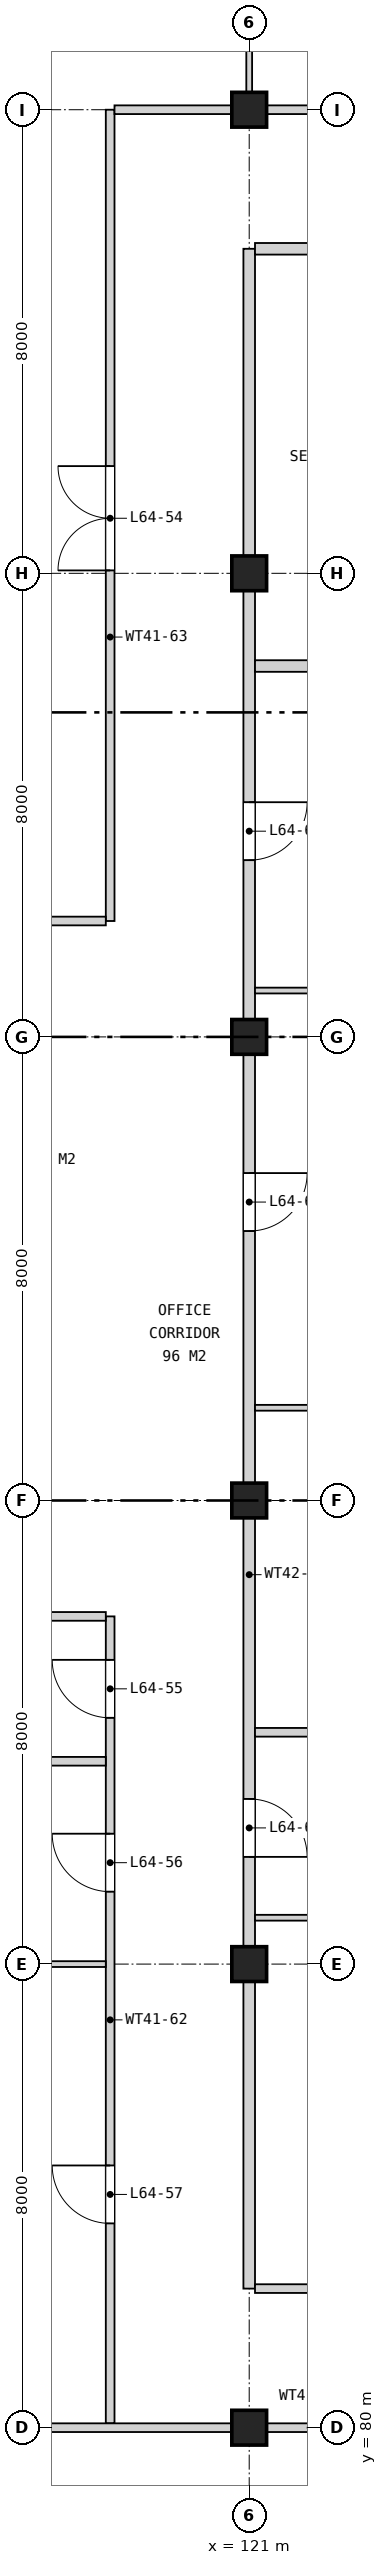
"""IFC4 building model, lengths in metres.
Left out: names, types, materials, properties, quantities, classifications, styles, units other than length and angle.
Written with IfcOpenShell. Run it as: python <this file> out.ifc"""

import sys

from ifc_helpers import new_model, si_unit, direction, frame, frame_2d, origin, origin_2d, place, context, subcontext, project, spatial, rectangle, extrude, element, fill, save


model = new_model("IFC4")
c1 = context("Model", 3, precision=1e-05, world=origin(), true_north=direction((0.0, 1.0)))
c2 = subcontext(c1, "Body", "Model", "MODEL_VIEW")
j1 = project(units=[si_unit("LENGTHUNIT", "METRE"), si_unit("PLANEANGLEUNIT", "RADIAN")], contexts=[c1])
p1 = place(None, origin())
s1 = spatial("IfcSite", under=j1, at=p1, CompositionType="ELEMENT")
p2 = place(p1, origin())
s2 = spatial("IfcBuilding", under=s1, at=p2, CompositionType="ELEMENT")
p3 = place(p2, frame((0.0, 0.0, 295.5)))
s3 = spatial("IfcBuildingStorey", under=s2, at=p3, CompositionType="ELEMENT", Elevation=295.5)
for number, where, z_axis, x_axis in (
    (1, (121.0, 80.0, 0.0), (0.0, 0.0, 1.0), (1.0, 0.0, 0.0)),
    (2, (121.0, 88.0, 0.0), (0.0, 0.0, 1.0), (1.0, 0.0, 0.0)),
    (3, (121.0, 96.0, 0.0), (0.0, 0.0, 1.0), (1.0, 0.0, 0.0)),
    (4, (121.0, 104.0, 0.0), (0.0, 0.0, 1.0), (1.0, 0.0, 0.0)),
    (5, (121.0, 112.0, 0.0), (0.0, 0.0, 1.0), (1.0, 0.0, 0.0)),
    (6, (121.0, 120.0, 0.0), (0.0, 0.0, 1.0), (1.0, 0.0, 0.0)),
):
    element("IfcColumn", number, at=place(p3, frame(where, z_axis=z_axis, x_axis=x_axis)), inside=s3, PredefinedType="COLUMN", context=c2, shape_type="SweptSolid", body=[
        extrude(rectangle(XDim=0.6, YDim=0.6, at=origin_2d()), origin(), (0.0, 0.0, 1.0), 4.2),
    ])
p4 = place(p3, frame((118.6, 80.075, 0.0), z_axis=(0.0, 0.0, 1.0), x_axis=(0.0, 1.0, 0.0)))
e7 = element("IfcWall", 7, at=p4, inside=s3, PredefinedType="PARTITIONING", context=c2, shape_type="SweptSolid", body=[
    extrude(rectangle(XDim=13.925, YDim=0.15, at=frame_2d((6.962, 0.0))), origin(), (0.0, 0.0, 1.0), 3.443),
])
p5 = place(p4, frame((12.175, 0.0, 0.0)))
e8 = element("IfcOpeningElement", 8, at=p5, cuts=e7, PredefinedType="OPENING", context=c2, shape_type="SweptSolid", body=[
    extrude(rectangle(XDim=1.0, YDim=2.1, at=frame_2d((0.5, 1.05))), frame((0.0, 0.085, 0.0), z_axis=(0.0, -1.0, 0.0), x_axis=(1.0, 0.0, 0.0)), (0.0, 0.0, 1.0), 0.17),
])
p6 = place(p4, frame((9.175, 0.0, 0.0)))
e9 = element("IfcOpeningElement", 9, at=p6, cuts=e7, PredefinedType="OPENING", context=c2, shape_type="SweptSolid", body=[
    extrude(rectangle(XDim=1.0, YDim=2.1, at=frame_2d((0.5, 1.05))), frame((0.0, 0.085, 0.0), z_axis=(0.0, -1.0, 0.0), x_axis=(1.0, 0.0, 0.0)), (0.0, 0.0, 1.0), 0.17),
])
p7 = place(p4, frame((3.45, 0.0, 0.0)))
e10 = element("IfcOpeningElement", 10, at=p7, cuts=e7, PredefinedType="OPENING", context=c2, shape_type="SweptSolid", body=[
    extrude(rectangle(XDim=1.0, YDim=2.1, at=frame_2d((0.5, 1.05))), frame((0.0, 0.085, 0.0), z_axis=(0.0, -1.0, 0.0), x_axis=(1.0, 0.0, 0.0)), (0.0, 0.0, 1.0), 0.17),
])
p8 = place(p3, frame((118.6, 106.0, 0.0), z_axis=(0.0, 0.0, 1.0), x_axis=(0.0, 1.0, 0.0)))
e11 = element("IfcWall", 11, at=p8, inside=s3, PredefinedType="PARTITIONING", context=c2, shape_type="SweptSolid", body=[
    extrude(rectangle(XDim=14.0, YDim=0.15, at=frame_2d((7.0, 0.0))), origin(), (0.0, 0.0, 1.0), 3.443),
])
p9 = place(p8, frame((6.05, 0.0, 0.0)))
e12 = element("IfcOpeningElement", 12, at=p9, cuts=e11, PredefinedType="OPENING", context=c2, shape_type="SweptSolid", body=[
    extrude(rectangle(XDim=1.8, YDim=2.1, at=frame_2d((0.9, 1.05))), frame((0.0, 0.085, 0.0), z_axis=(0.0, -1.0, 0.0), x_axis=(1.0, 0.0, 0.0)), (0.0, 0.0, 1.0), 0.17),
])
p10 = place(p3, frame((121.0, 82.4, 0.0), z_axis=(0.0, 0.0, 1.0), x_axis=(0.0, 1.0, 0.0)))
e13 = element("IfcWall", 13, at=p10, inside=s3, PredefinedType="SOLIDWALL", context=c2, shape_type="SweptSolid", body=[
    extrude(rectangle(XDim=35.2, YDim=0.2, at=frame_2d((17.6, 0.0))), origin(), (0.0, 0.0, 1.0), 3.443),
])
p11 = place(p10, frame((7.45, 0.0, 0.0)))
e14 = element("IfcOpeningElement", 14, at=p11, cuts=e13, PredefinedType="OPENING", context=c2, shape_type="SweptSolid", body=[
    extrude(rectangle(XDim=1.0, YDim=2.1, at=frame_2d((0.5, 1.05))), frame((0.0, 0.11, 0.0), z_axis=(0.0, -1.0, 0.0), x_axis=(1.0, 0.0, 0.0)), (0.0, 0.0, 1.0), 0.22),
])
p12 = place(p10, frame((18.25, 0.0, 0.0)))
e15 = element("IfcOpeningElement", 15, at=p12, cuts=e13, PredefinedType="OPENING", context=c2, shape_type="SweptSolid", body=[
    extrude(rectangle(XDim=1.0, YDim=2.1, at=frame_2d((0.5, 1.05))), frame((0.0, 0.11, 0.0), z_axis=(0.0, -1.0, 0.0), x_axis=(1.0, 0.0, 0.0)), (0.0, 0.0, 1.0), 0.22),
])
p13 = place(p10, frame((24.65, 0.0, 0.0)))
e16 = element("IfcOpeningElement", 16, at=p13, cuts=e13, PredefinedType="OPENING", context=c2, shape_type="SweptSolid", body=[
    extrude(rectangle(XDim=1.0, YDim=2.1, at=frame_2d((0.5, 1.05))), frame((0.0, 0.11, 0.0), z_axis=(0.0, -1.0, 0.0), x_axis=(1.0, 0.0, 0.0)), (0.0, 0.0, 1.0), 0.22),
])
p14 = place(p3, frame((121.0, 120.075, 0.0), z_axis=(0.0, 0.0, 1.0), x_axis=(0.0, 1.0, 0.0)))
e17 = element("IfcWall", 17, at=p14, inside=s3, PredefinedType="PARTITIONING", context=c2, shape_type="SweptSolid", body=[
    extrude(rectangle(XDim=8.145, YDim=0.1, at=frame_2d((4.073, 0.0))), origin(), (0.0, 0.0, 1.0), 3.443),
])
p15 = place(p3, frame((112.78, 80.0, 0.0), z_axis=(0.0, 0.0, 1.0), x_axis=(1.0, 0.0, 0.0)))
e18 = element("IfcWall", 18, at=p15, inside=s3, PredefinedType="PARTITIONING", context=c2, shape_type="SweptSolid", body=[
    extrude(rectangle(XDim=18.545, YDim=0.15, at=frame_2d((9.272, 0.0))), origin(), (0.0, 0.0, 1.0), 3.443),
])
p16 = place(p15, frame((11.27, 0.0, 0.0)))
e19 = element("IfcOpeningElement", 19, at=p16, cuts=e18, PredefinedType="OPENING", context=c2, shape_type="SweptSolid", body=[
    extrude(rectangle(XDim=1.8, YDim=2.1, at=frame_2d((0.9, 1.05))), frame((0.0, 0.085, 0.0), z_axis=(0.0, -1.0, 0.0), x_axis=(1.0, 0.0, 0.0)), (0.0, 0.0, 1.0), 0.17),
])
p17 = place(p3, frame((121.1, 82.4, 0.0), z_axis=(0.0, 0.0, 1.0), x_axis=(1.0, 0.0, 0.0)))
e20 = element("IfcWall", 20, at=p17, inside=s3, PredefinedType="PARTITIONING", context=c2, shape_type="SweptSolid", body=[
    extrude(rectangle(XDim=7.825, YDim=0.15, at=frame_2d((3.913, 0.0))), origin(), (0.0, 0.0, 1.0), 3.443),
])
p18 = place(p17, frame((3.45, 0.0, 0.0)))
e21 = element("IfcOpeningElement", 21, at=p18, cuts=e20, PredefinedType="OPENING", context=c2, shape_type="SweptSolid", body=[
    extrude(rectangle(XDim=1.0, YDim=2.1, at=frame_2d((0.5, 1.05))), frame((0.0, 0.085, 0.0), z_axis=(0.0, -1.0, 0.0), x_axis=(1.0, 0.0, 0.0)), (0.0, 0.0, 1.0), 0.17),
])
p19 = place(p3, frame((113.0, 88.0, 0.0), z_axis=(0.0, 0.0, 1.0), x_axis=(1.0, 0.0, 0.0)))
e22 = element("IfcWall", 22, at=p19, inside=s3, PredefinedType="PARTITIONING", context=c2, shape_type="SweptSolid", body=[
    extrude(rectangle(XDim=5.525, YDim=0.1, at=frame_2d((2.762, 0.0))), origin(), (0.0, 0.0, 1.0), 3.443),
])
p20 = place(p3, frame((121.1, 88.8, 0.0), z_axis=(0.0, 0.0, 1.0), x_axis=(1.0, 0.0, 0.0)))
e23 = element("IfcWall", 23, at=p20, inside=s3, PredefinedType="PARTITIONING", context=c2, shape_type="SweptSolid", body=[
    extrude(rectangle(XDim=7.825, YDim=0.1, at=frame_2d((3.913, 0.0))), origin(), (0.0, 0.0, 1.0), 3.443),
])
p21 = place(p3, frame((113.0, 91.5, 0.0), z_axis=(0.0, 0.0, 1.0), x_axis=(1.0, 0.0, 0.0)))
e24 = element("IfcWall", 24, at=p21, inside=s3, PredefinedType="PARTITIONING", context=c2, shape_type="SweptSolid", body=[
    extrude(rectangle(XDim=5.525, YDim=0.15, at=frame_2d((2.762, 0.0))), origin(), (0.0, 0.0, 1.0), 3.443),
])
p22 = place(p3, frame((121.1, 92.0, 0.0), z_axis=(0.0, 0.0, 1.0), x_axis=(1.0, 0.0, 0.0)))
e25 = element("IfcWall", 25, at=p22, inside=s3, PredefinedType="PARTITIONING", context=c2, shape_type="SweptSolid", body=[
    extrude(rectangle(XDim=7.825, YDim=0.15, at=frame_2d((3.913, 0.0))), origin(), (0.0, 0.0, 1.0), 3.443),
])
p23 = place(p3, frame((113.0, 94.0, 0.0), z_axis=(0.0, 0.0, 1.0), x_axis=(1.0, 0.0, 0.0)))
e26 = element("IfcWall", 26, at=p23, inside=s3, PredefinedType="PARTITIONING", context=c2, shape_type="SweptSolid", body=[
    extrude(rectangle(XDim=5.525, YDim=0.15, at=frame_2d((2.762, 0.0))), origin(), (0.0, 0.0, 1.0), 3.443),
])
for number, where, z_axis, x_axis in (
    (27, (121.1, 97.6, 0.0), (0.0, 0.0, 1.0), (1.0, 0.0, 0.0)),
    (28, (121.1, 104.8, 0.0), (0.0, 0.0, 1.0), (1.0, 0.0, 0.0)),
):
    element("IfcWall", number, at=place(p3, frame(where, z_axis=z_axis, x_axis=x_axis)), inside=s3, PredefinedType="PARTITIONING", context=c2, shape_type="SweptSolid", body=[
        extrude(rectangle(XDim=7.825, YDim=0.1, at=frame_2d((3.913, 0.0))), origin(), (0.0, 0.0, 1.0), 3.443),
    ])
p24 = place(p3, frame((113.0, 106.0, 0.0), z_axis=(0.0, 0.0, 1.0), x_axis=(1.0, 0.0, 0.0)))
e29 = element("IfcWall", 29, at=p24, inside=s3, PredefinedType="PARTITIONING", context=c2, shape_type="SweptSolid", body=[
    extrude(rectangle(XDim=5.525, YDim=0.15, at=frame_2d((2.762, 0.0))), origin(), (0.0, 0.0, 1.0), 3.443),
])
p25 = place(p3, frame((121.1, 117.6, 0.0), z_axis=(0.0, 0.0, 1.0), x_axis=(1.0, 0.0, 0.0)))
e30 = element("IfcWall", 30, at=p25, inside=s3, PredefinedType="SOLIDWALL", context=c2, shape_type="SweptSolid", body=[
    extrude(rectangle(XDim=7.9, YDim=0.2, at=frame_2d((3.95, 0.0))), origin(), (0.0, 0.0, 1.0), 3.443),
])
p26 = place(p25, frame((1.45, 0.0, 0.0)))
e31 = element("IfcOpeningElement", 31, at=p26, cuts=e30, PredefinedType="OPENING", context=c2, shape_type="SweptSolid", body=[
    extrude(rectangle(XDim=1.0, YDim=2.1, at=frame_2d((0.5, 1.05))), frame((0.0, 0.11, 0.0), z_axis=(0.0, -1.0, 0.0), x_axis=(1.0, 0.0, 0.0)), (0.0, 0.0, 1.0), 0.22),
])
p27 = place(p25, frame((5.35, 0.0, 0.0)))
e32 = element("IfcOpeningElement", 32, at=p27, cuts=e30, PredefinedType="OPENING", context=c2, shape_type="SweptSolid", body=[
    extrude(rectangle(XDim=1.0, YDim=2.1, at=frame_2d((0.5, 1.05))), frame((0.0, 0.11, 0.0), z_axis=(0.0, -1.0, 0.0), x_axis=(1.0, 0.0, 0.0)), (0.0, 0.0, 1.0), 0.22),
])
p28 = place(p3, frame((118.675, 120.0, 0.0), z_axis=(0.0, 0.0, 1.0), x_axis=(1.0, 0.0, 0.0)))
e33 = element("IfcWall", 33, at=p28, inside=s3, PredefinedType="PARTITIONING", context=c2, shape_type="SweptSolid", body=[
    extrude(rectangle(XDim=18.545, YDim=0.15, at=frame_2d((9.272, 0.0))), origin(), (0.0, 0.0, 1.0), 3.443),
])
p29 = place(p28, frame((5.375, 0.0, 0.0)))
e34 = element("IfcOpeningElement", 34, at=p29, cuts=e33, PredefinedType="OPENING", context=c2, shape_type="SweptSolid", body=[
    extrude(rectangle(XDim=1.8, YDim=2.1, at=frame_2d((0.9, 1.05))), frame((0.0, 0.085, 0.0), z_axis=(0.0, -1.0, 0.0), x_axis=(1.0, 0.0, 0.0)), (0.0, 0.0, 1.0), 0.17),
])
p30 = place(p3, frame((121.1, 110.4, 0.0), z_axis=(0.0, 0.0, 1.0), x_axis=(1.0, 0.0, 0.0)))
e35 = element("IfcWall", 35, at=p30, inside=s3, PredefinedType="SOLIDWALL", context=c2, shape_type="SweptSolid", body=[
    extrude(rectangle(XDim=3.8, YDim=0.2, at=frame_2d((1.9, 0.0))), origin(), (0.0, 0.0, 1.0), 3.443),
])
p31 = place(p9, origin())
e36 = element("IfcDoor", 36, at=p31, inside=s3, OperationType="DOUBLE_DOOR_SINGLE_SWING", PredefinedType="DOOR", context=c2, shape_type="SweptSolid", body=[
    extrude(rectangle(XDim=1.8, YDim=2.1, at=frame_2d((0.9, 1.05))), frame((0.0, 0.025, 0.0), z_axis=(0.0, -1.0, 0.0), x_axis=(1.0, 0.0, 0.0)), (0.0, 0.0, 1.0), 0.05),
])
fill(e12, e36)
p32 = place(p5, origin())
e37 = element("IfcDoor", 37, at=p32, inside=s3, OperationType="SINGLE_SWING_RIGHT", PredefinedType="DOOR", context=c2, shape_type="SweptSolid", body=[
    extrude(rectangle(XDim=1.0, YDim=2.1, at=frame_2d((0.5, 1.05))), frame((0.0, 0.025, 0.0), z_axis=(0.0, -1.0, 0.0), x_axis=(1.0, 0.0, 0.0)), (0.0, 0.0, 1.0), 0.05),
])
fill(e8, e37)
p33 = place(p6, origin())
e38 = element("IfcDoor", 38, at=p33, inside=s3, OperationType="SINGLE_SWING_RIGHT", PredefinedType="DOOR", context=c2, shape_type="SweptSolid", body=[
    extrude(rectangle(XDim=1.0, YDim=2.1, at=frame_2d((0.5, 1.05))), frame((0.0, 0.025, 0.0), z_axis=(0.0, -1.0, 0.0), x_axis=(1.0, 0.0, 0.0)), (0.0, 0.0, 1.0), 0.05),
])
fill(e9, e38)
p34 = place(p7, origin())
e39 = element("IfcDoor", 39, at=p34, inside=s3, OperationType="SINGLE_SWING_RIGHT", PredefinedType="DOOR", context=c2, shape_type="SweptSolid", body=[
    extrude(rectangle(XDim=1.0, YDim=2.1, at=frame_2d((0.5, 1.05))), frame((0.0, 0.025, 0.0), z_axis=(0.0, -1.0, 0.0), x_axis=(1.0, 0.0, 0.0)), (0.0, 0.0, 1.0), 0.05),
])
fill(e10, e39)
p35 = place(p11, frame((1.0, 0.0, 0.0), z_axis=(0.0, 0.0, 1.0), x_axis=(-1.0, 0.0, 0.0)))
e40 = element("IfcDoor", 40, at=p35, inside=s3, OperationType="SINGLE_SWING_RIGHT", PredefinedType="DOOR", context=c2, shape_type="SweptSolid", body=[
    extrude(rectangle(XDim=1.0, YDim=2.1, at=frame_2d((0.5, 1.05))), frame((0.0, 0.025, 0.0), z_axis=(0.0, -1.0, 0.0), x_axis=(1.0, 0.0, 0.0)), (0.0, 0.0, 1.0), 0.05),
])
fill(e14, e40)
p36 = place(p12, frame((1.0, 0.0, 0.0), z_axis=(0.0, 0.0, 1.0), x_axis=(-1.0, 0.0, 0.0)))
e41 = element("IfcDoor", 41, at=p36, inside=s3, OperationType="SINGLE_SWING_LEFT", PredefinedType="DOOR", context=c2, shape_type="SweptSolid", body=[
    extrude(rectangle(XDim=1.0, YDim=2.1, at=frame_2d((0.5, 1.05))), frame((0.0, 0.025, 0.0), z_axis=(0.0, -1.0, 0.0), x_axis=(1.0, 0.0, 0.0)), (0.0, 0.0, 1.0), 0.05),
])
fill(e15, e41)
p37 = place(p13, frame((1.0, 0.0, 0.0), z_axis=(0.0, 0.0, 1.0), x_axis=(-1.0, 0.0, 0.0)))
e42 = element("IfcDoor", 42, at=p37, inside=s3, OperationType="SINGLE_SWING_LEFT", PredefinedType="DOOR", context=c2, shape_type="SweptSolid", body=[
    extrude(rectangle(XDim=1.0, YDim=2.1, at=frame_2d((0.5, 1.05))), frame((0.0, 0.025, 0.0), z_axis=(0.0, -1.0, 0.0), x_axis=(1.0, 0.0, 0.0)), (0.0, 0.0, 1.0), 0.05),
])
fill(e16, e42)
save(model, sys.argv[1])
